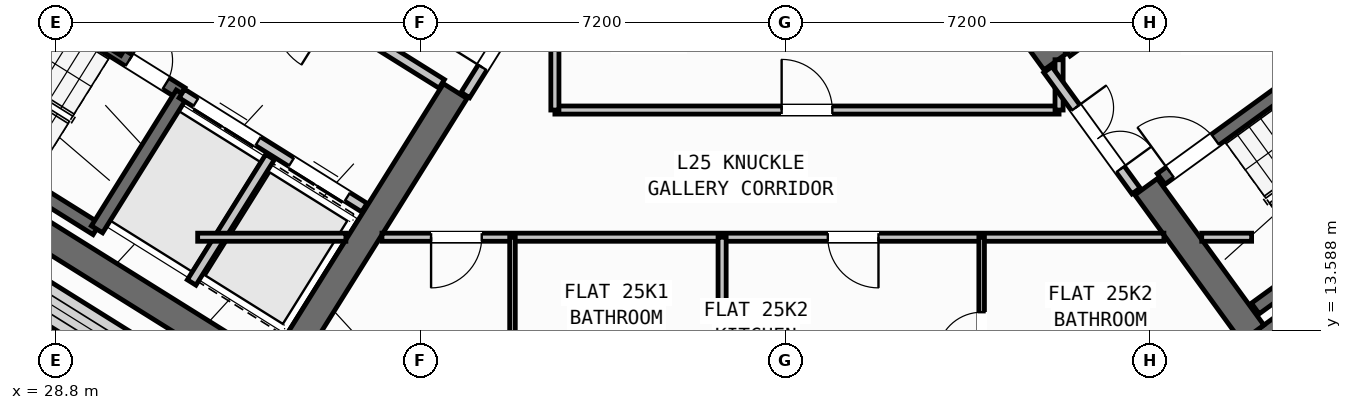
"""IFC4 building model, lengths in metres.
Left out: names, types, materials, properties, quantities, classifications, styles, units other than length and angle.
Written with IfcOpenShell. Run it as: python <this file> out.ifc"""

import sys

from ifc_helpers import new_model, si_unit, direction, frame, frame_2d, origin, place, context, subcontext, project, spatial, rectangle, extrude, source, transform, mapped, element, fill, save


model = new_model("IFC4")
c1 = context("Model", 3, precision=1e-05, world=origin(), true_north=direction((0.0, 1.0)))
c2 = subcontext(c1, "Body", "Model", "MODEL_VIEW")
j1 = project(units=[si_unit("LENGTHUNIT", "METRE"), si_unit("PLANEANGLEUNIT", "RADIAN")], contexts=[c1])
p1 = place(None, origin())
s1 = spatial("IfcSite", under=j1, at=p1, CompositionType="ELEMENT")
p2 = place(p1, origin())
s2 = spatial("IfcBuilding", under=s1, at=p2, CompositionType="ELEMENT")
p3 = place(p2, frame((0.0, 0.0, 100.8)))
s3 = spatial("IfcBuildingStorey", under=s2, at=p3, CompositionType="ELEMENT", Elevation=100.8)
p4 = place(p3, frame((33.366, 12.477, 0.0), z_axis=(0.0, 0.0, 1.0), x_axis=(-0.848047359947, 0.529920442413, 0.0)))
e1 = element("IfcWall", 1, at=p4, inside=s3, PredefinedType="SHEAR", context=c2, shape_type="SweptSolid", body=[
    extrude(rectangle(XDim=13.14, YDim=0.55, at=frame_2d((6.57, 0.0))), origin(), (0.0, 0.0, 1.0), 4.25),
])
p5 = place(p3, frame((36.683, 18.304, 0.0), z_axis=(0.0, 0.0, 1.0), x_axis=(-0.529896466841, -0.848062341122, 0.0)))
e2 = element("IfcWall", 2, at=p5, inside=s3, PredefinedType="SHEAR", context=c2, shape_type="SweptSolid", body=[
    extrude(rectangle(XDim=6.425, YDim=0.55, at=frame_2d((3.212, 0.0))), origin(), (0.0, 0.0, 1.0), 4.25),
])
p6 = place(p3, frame((52.359, 13.14, 0.0), z_axis=(0.0, 0.0, 1.0), x_axis=(0.809014896919, 0.587788139183, 0.0)))
e3 = element("IfcWall", 3, at=p6, inside=s3, PredefinedType="SHEAR", context=c2, shape_type="SweptSolid", body=[
    extrude(rectangle(XDim=12.34, YDim=0.55, at=frame_2d((6.17, 0.0))), origin(), (0.0, 0.0, 1.0), 4.25),
])
p7 = place(p3, frame((52.42, 13.524, 0.0), z_axis=(0.0, 0.0, 1.0), x_axis=(-0.587802113096, 0.809004744015, 0.0)))
e4 = element("IfcWall", 4, at=p7, inside=s3, PredefinedType="SHEAR", context=c2, shape_type="SweptSolid", body=[
    extrude(rectangle(XDim=3.575, YDim=0.55, at=frame_2d((1.788, 0.0))), origin(), (0.0, 0.0, 1.0), 4.25),
])
p8 = place(p3, frame((48.526, 18.884, 0.0), z_axis=(0.0, 0.0, 1.0), x_axis=(-0.587764933797, 0.809031756236, 0.0)))
e5 = element("IfcWall", 5, at=p8, inside=s3, PredefinedType="SHEAR", context=c2, shape_type="SweptSolid", body=[
    extrude(rectangle(XDim=6.425, YDim=0.55, at=frame_2d((3.212, 0.0))), origin(), (0.0, 0.0, 1.0), 4.25),
])
p9 = place(p3, frame((31.76, 12.183, 0.0), z_axis=(0.0, 0.0, 1.0), x_axis=(-0.848047074256, 0.529920899612, 0.0)))
e6 = element("IfcWall", 6, at=p9, inside=s3, PredefinedType="STANDARD", context=c2, shape_type="SweptSolid", body=[
    extrude(rectangle(XDim=30.652, YDim=0.32, at=frame_2d((15.326, 0.0))), origin(), (0.0, 0.0, 1.0), 4.25),
])
p10 = place(p9, frame((15.153, 0.0, 0.0)))
e7 = element("IfcOpeningElement", 7, at=p10, cuts=e6, PredefinedType="OPENING", context=c2, shape_type="SweptSolid", body=[
    extrude(rectangle(XDim=1.2, YDim=2.15, at=frame_2d((0.6, 1.075))), frame((0.0, 0.17, 0.0), z_axis=(0.0, -1.0, 0.0), x_axis=(1.0, 0.0, 0.0)), (0.0, 0.0, 1.0), 0.34),
])
p11 = place(p9, frame((1.652, 0.0, 0.65)))
e8 = element("IfcOpeningElement", 8, at=p11, cuts=e6, PredefinedType="OPENING", context=c2, shape_type="SweptSolid", body=[
    extrude(rectangle(XDim=2.8, YDim=2.1, at=frame_2d((1.4, 1.05))), frame((0.0, 0.17, 0.0), z_axis=(0.0, -1.0, 0.0), x_axis=(1.0, 0.0, 0.0)), (0.0, 0.0, 1.0), 0.34),
])
p12 = place(p9, frame((6.856, 0.0, 0.65)))
e9 = element("IfcOpeningElement", 9, at=p12, cuts=e6, PredefinedType="OPENING", context=c2, shape_type="SweptSolid", body=[
    extrude(rectangle(XDim=2.8, YDim=2.1, at=frame_2d((1.4, 1.05))), frame((0.0, 0.17, 0.0), z_axis=(0.0, -1.0, 0.0), x_axis=(1.0, 0.0, 0.0)), (0.0, 0.0, 1.0), 0.34),
])
p13 = place(p9, frame((20.478, 0.0, 0.85)))
e10 = element("IfcOpeningElement", 10, at=p13, cuts=e6, PredefinedType="OPENING", context=c2, shape_type="SweptSolid", body=[
    extrude(rectangle(XDim=1.5, YDim=1.5, at=frame_2d((0.75, 0.75))), frame((0.0, 0.17, 0.0), z_axis=(0.0, -1.0, 0.0), x_axis=(1.0, 0.0, 0.0)), (0.0, 0.0, 1.0), 0.34),
])
p14 = place(p9, frame((26.258, 0.0, 0.65)))
e11 = element("IfcOpeningElement", 11, at=p14, cuts=e6, PredefinedType="OPENING", context=c2, shape_type="SweptSolid", body=[
    extrude(rectangle(XDim=2.8, YDim=2.1, at=frame_2d((1.4, 1.05))), frame((0.0, 0.17, 0.0), z_axis=(0.0, -1.0, 0.0), x_axis=(1.0, 0.0, 0.0)), (0.0, 0.0, 1.0), 0.34),
])
p15 = place(p3, frame((29.605, 15.581, 0.0), z_axis=(0.0, 0.0, 1.0), x_axis=(-0.848036911448, 0.529937163087, 0.0)))
e12 = element("IfcWall", 12, at=p15, inside=s3, PredefinedType="SHEAR", context=c2, shape_type="SweptSolid", body=[
    extrude(rectangle(XDim=7.46, YDim=0.26, at=frame_2d((3.73, 0.0))), origin(), (0.0, 0.0, 1.0), 4.25),
])
p16 = place(p3, frame((31.28, 18.261, 0.0), z_axis=(0.0, 0.0, 1.0), x_axis=(-0.848051618787, 0.529913626805, 0.0)))
e13 = element("IfcWall", 13, at=p16, inside=s3, PredefinedType="SHEAR", context=c2, shape_type="SweptSolid", body=[
    extrude(rectangle(XDim=7.46, YDim=0.26, at=frame_2d((3.73, 0.0))), origin(), (0.0, 0.0, 1.0), 4.25),
])
p17 = place(p16, frame((0.36, 0.0, 0.0)))
e14 = element("IfcOpeningElement", 14, at=p17, cuts=e13, PredefinedType="OPENING", context=c2, shape_type="SweptSolid", body=[
    extrude(rectangle(XDim=0.86, YDim=2.05, at=frame_2d((0.43, 1.025))), frame((0.0, 0.14, 0.0), z_axis=(0.0, -1.0, 0.0), x_axis=(1.0, 0.0, 0.0)), (0.0, 0.0, 1.0), 0.28),
])
p18 = place(p3, frame((31.288, 18.256, 0.0), z_axis=(0.0, 0.0, 1.0), x_axis=(-0.529943379326, -0.848033026897, 0.0)))
e15 = element("IfcWall", 15, at=p18, inside=s3, PredefinedType="SHEAR", context=c2, shape_type="SweptSolid", body=[
    extrude(rectangle(XDim=3.16, YDim=0.26, at=frame_2d((1.58, 0.0))), origin(), (0.0, 0.0, 1.0), 4.25),
])
p19 = place(p3, frame((34.891, 16.005, 0.0), z_axis=(0.0, 0.0, 1.0), x_axis=(-0.848062873452, 0.529895614884, 0.0)))
e16 = element("IfcWall", 16, at=p19, inside=s3, PredefinedType="STANDARD", context=c2, shape_type="SweptSolid", body=[
    extrude(rectangle(XDim=4.248, YDim=0.2, at=frame_2d((2.124, 0.0))), origin(), (0.0, 0.0, 1.0), 4.24),
])
p20 = place(p19, frame((0.398, 0.0, 0.0)))
e17 = element("IfcOpeningElement", 17, at=p20, cuts=e16, PredefinedType="OPENING", context=c2, shape_type="SweptSolid", body=[
    extrude(rectangle(XDim=1.3, YDim=2.2, at=frame_2d((0.65, 1.1))), frame((0.0, 0.11, 0.0), z_axis=(0.0, -1.0, 0.0), x_axis=(1.0, 0.0, 0.0)), (0.0, 0.0, 1.0), 0.22),
])
p21 = place(p19, frame((2.473, 0.0, 0.0)))
e18 = element("IfcOpeningElement", 18, at=p21, cuts=e16, PredefinedType="OPENING", context=c2, shape_type="SweptSolid", body=[
    extrude(rectangle(XDim=1.45, YDim=2.25, at=frame_2d((0.725, 1.125))), frame((0.0, 0.11, 0.0), z_axis=(0.0, -1.0, 0.0), x_axis=(1.0, 0.0, 0.0)), (0.0, 0.0, 1.0), 0.22),
])
p22 = place(p3, frame((36.417, 18.447, 0.0), z_axis=(0.0, 0.0, 1.0), x_axis=(-0.848064879198, 0.529892404805, 0.0)))
e19 = element("IfcWall", 19, at=p22, inside=s3, PredefinedType="STANDARD", context=c2, shape_type="SweptSolid", body=[
    extrude(rectangle(XDim=5.768, YDim=0.2, at=frame_2d((2.884, 0.0))), origin(), (0.0, 0.0, 1.0), 4.24),
])
p23 = place(p22, frame((2.548, 0.0, 0.0)))
e20 = element("IfcOpeningElement", 20, at=p23, cuts=e19, PredefinedType="OPENING", context=c2, shape_type="SweptSolid", body=[
    extrude(rectangle(XDim=1.15, YDim=2.1, at=frame_2d((0.575, 1.05))), frame((0.0, 0.11, 0.0), z_axis=(0.0, -1.0, 0.0), x_axis=(1.0, 0.0, 0.0)), (0.0, 0.0, 1.0), 0.22),
])
p24 = place(p3, frame((33.029, 17.003, 0.0), z_axis=(0.0, 0.0, 1.0), x_axis=(-0.529916267533, -0.848049968695, 0.0)))
e21 = element("IfcWall", 21, at=p24, inside=s3, PredefinedType="STANDARD", context=c2, shape_type="SweptSolid", body=[
    extrude(rectangle(XDim=2.92, YDim=0.2, at=frame_2d((1.46, 0.0))), origin(), (0.0, 0.0, 1.0), 4.24),
])
p25 = place(p3, frame((31.525, 21.504, 0.0), z_axis=(0.0, 0.0, 1.0), x_axis=(-0.529907497854, -0.848055448493, 0.0)))
e22 = element("IfcWall", 22, at=p25, inside=s3, PredefinedType="STANDARD", context=c2, shape_type="SweptSolid", body=[
    extrude(rectangle(XDim=2.88, YDim=0.2, at=frame_2d((1.44, 0.0))), origin(), (0.0, 0.0, 1.0), 4.24),
])
p26 = place(p3, frame((52.472, 14.013, 0.0), z_axis=(0.0, 0.0, 1.0), x_axis=(0.809028366311, 0.587769599847, 0.0)))
e23 = element("IfcWall", 23, at=p26, inside=s3, PredefinedType="SHEAR", context=c2, shape_type="SweptSolid", body=[
    extrude(rectangle(XDim=7.33, YDim=0.26, at=frame_2d((3.665, 0.0))), origin(), (0.0, 0.0, 1.0), 4.25),
])
p27 = place(p3, frame((50.615, 16.57, 0.0), z_axis=(0.0, 0.0, 1.0), x_axis=(0.809028366311, 0.587769599847, 0.0)))
e24 = element("IfcWall", 24, at=p27, inside=s3, PredefinedType="SHEAR", context=c2, shape_type="SweptSolid", body=[
    extrude(rectangle(XDim=7.33, YDim=0.26, at=frame_2d((3.665, 0.0))), origin(), (0.0, 0.0, 1.0), 4.25),
])
p28 = place(p27, frame((0.22, 0.0, 0.0)))
e25 = element("IfcOpeningElement", 25, at=p28, cuts=e24, PredefinedType="OPENING", context=c2, shape_type="SweptSolid", body=[
    extrude(rectangle(XDim=1.1, YDim=2.1, at=frame_2d((0.55, 1.05))), frame((0.0, 0.14, 0.0), z_axis=(0.0, -1.0, 0.0), x_axis=(1.0, 0.0, 0.0)), (0.0, 0.0, 1.0), 0.28),
])
p29 = place(p3, frame((48.758, 19.077, 0.0), z_axis=(0.0, 0.0, 1.0), x_axis=(0.809005065155, 0.587801671104, 0.0)))
e26 = element("IfcWall", 26, at=p29, inside=s3, PredefinedType="STANDARD", context=c2, shape_type="SweptSolid", body=[
    extrude(rectangle(XDim=5.768, YDim=0.2, at=frame_2d((2.884, 0.0))), origin(), (0.0, 0.0, 1.0), 4.24),
])
p30 = place(p29, frame((2.548, 0.0, 0.0)))
e27 = element("IfcOpeningElement", 27, at=p30, cuts=e26, PredefinedType="OPENING", context=c2, shape_type="SweptSolid", body=[
    extrude(rectangle(XDim=1.15, YDim=2.1, at=frame_2d((0.575, 1.05))), frame((0.0, 0.11, 0.0), z_axis=(0.0, -1.0, 0.0), x_axis=(1.0, 0.0, 0.0)), (0.0, 0.0, 1.0), 0.22),
])
p31 = place(p3, frame((38.451, 20.737, 0.0), z_axis=(0.0, 0.0, 1.0), x_axis=(-0.529924799939, -0.848044637038, 0.0)))
e28 = element("IfcWall", 28, at=p31, inside=s3, PredefinedType="STANDARD", context=c2, shape_type="SweptSolid", body=[
    extrude(rectangle(XDim=2.96, YDim=0.2, at=frame_2d((1.48, 0.0))), origin(), (0.0, 0.0, 1.0), 4.24),
])
p32 = place(p31, frame((1.46, 0.0, 0.0)))
e29 = element("IfcOpeningElement", 29, at=p32, cuts=e28, PredefinedType="OPENING", context=c2, shape_type="SweptSolid", body=[
    extrude(rectangle(XDim=0.86, YDim=2.05, at=frame_2d((0.43, 1.025))), frame((0.0, 0.11, 0.0), z_axis=(0.0, -1.0, 0.0), x_axis=(1.0, 0.0, 0.0)), (0.0, 0.0, 1.0), 0.22),
])
p33 = place(p3, frame((31.6, 15.42, 0.0), z_axis=(0.0, 0.0, 1.0), x_axis=(1.0, 0.0, 0.0)))
e30 = element("IfcWall", 30, at=p33, inside=s3, PredefinedType="PARTITIONING", context=c2, shape_type="SweptSolid", body=[
    extrude(rectangle(XDim=2.925, YDim=0.16, at=frame_2d((1.462, 0.0))), origin(), (0.0, 0.0, 1.0), 4.24),
])
p34 = place(p3, frame((35.237, 15.42, 0.0), z_axis=(0.0, 0.0, 1.0), x_axis=(1.0, 0.0, 0.0)))
e31 = element("IfcWall", 31, at=p34, inside=s3, PredefinedType="PARTITIONING", context=c2, shape_type="SweptSolid", body=[
    extrude(rectangle(XDim=15.432, YDim=0.16, at=frame_2d((7.716, 0.0))), origin(), (0.0, 0.0, 1.0), 4.24),
])
p35 = place(p34, frame((0.969, 0.0, 0.0)))
e32 = element("IfcOpeningElement", 32, at=p35, cuts=e31, PredefinedType="OPENING", context=c2, shape_type="SweptSolid", body=[
    extrude(rectangle(XDim=1.0, YDim=2.1, at=frame_2d((0.5, 1.05))), frame((0.0, 0.09, 0.0), z_axis=(0.0, -1.0, 0.0), x_axis=(1.0, 0.0, 0.0)), (0.0, 0.0, 1.0), 0.18),
])
p36 = place(p34, frame((8.799, 0.0, 0.0)))
e33 = element("IfcOpeningElement", 33, at=p36, cuts=e31, PredefinedType="OPENING", context=c2, shape_type="SweptSolid", body=[
    extrude(rectangle(XDim=1.0, YDim=2.1, at=frame_2d((0.5, 1.05))), frame((0.0, 0.09, 0.0), z_axis=(0.0, -1.0, 0.0), x_axis=(1.0, 0.0, 0.0)), (0.0, 0.0, 1.0), 0.18),
])
p37 = place(p3, frame((51.416, 15.42, 0.0), z_axis=(0.0, 0.0, 1.0), x_axis=(1.0, 0.0, 0.0)))
e34 = element("IfcWall", 34, at=p37, inside=s3, PredefinedType="PARTITIONING", context=c2, shape_type="SweptSolid", body=[
    extrude(rectangle(XDim=0.984, YDim=0.16, at=frame_2d((0.492, 0.0))), origin(), (0.0, 0.0, 1.0), 4.24),
])
p38 = place(p3, frame((38.65, 17.93, 0.0), z_axis=(0.0, 0.0, 1.0), x_axis=(1.0, 0.0, 0.0)))
e35 = element("IfcWall", 35, at=p38, inside=s3, PredefinedType="PARTITIONING", context=c2, shape_type="SweptSolid", body=[
    extrude(rectangle(XDim=9.95, YDim=0.16, at=frame_2d((4.975, 0.0))), origin(), (0.0, 0.0, 1.0), 4.24),
])
p39 = place(p38, frame((4.475, 0.0, 0.0)))
e36 = element("IfcOpeningElement", 36, at=p39, cuts=e35, PredefinedType="OPENING", context=c2, shape_type="SweptSolid", body=[
    extrude(rectangle(XDim=1.0, YDim=2.1, at=frame_2d((0.5, 1.05))), frame((0.0, 0.09, 0.0), z_axis=(0.0, -1.0, 0.0), x_axis=(1.0, 0.0, 0.0)), (0.0, 0.0, 1.0), 0.18),
])
p40 = place(p3, frame((38.65, 17.93, 0.0), z_axis=(0.0, 0.0, 1.0), x_axis=(0.0, 1.0, 0.0)))
e37 = element("IfcWall", 37, at=p40, inside=s3, PredefinedType="PARTITIONING", context=c2, shape_type="SweptSolid", body=[
    extrude(rectangle(XDim=2.951, YDim=0.16, at=frame_2d((1.476, 0.0))), origin(), (0.0, 0.0, 1.0), 4.24),
])
p41 = place(p3, frame((48.6, 17.93, 0.0), z_axis=(0.0, 0.0, 1.0), x_axis=(0.0, 1.0, 0.0)))
e38 = element("IfcWall", 38, at=p41, inside=s3, PredefinedType="PARTITIONING", context=c2, shape_type="SweptSolid", body=[
    extrude(rectangle(XDim=0.993, YDim=0.16, at=frame_2d((0.496, 0.0))), origin(), (0.0, 0.0, 1.0), 4.24),
])
p42 = place(p3, frame((50.119, 16.333, 0.0), z_axis=(0.0, 0.0, 1.0), x_axis=(-0.587749856981, 0.809042709391, 0.0)))
e39 = element("IfcWall", 39, at=p42, inside=s3, PredefinedType="STANDARD", context=c2, shape_type="SweptSolid", body=[
    extrude(rectangle(XDim=2.96, YDim=0.2, at=frame_2d((1.48, 0.0))), origin(), (0.0, 0.0, 1.0), 4.24),
])
p43 = place(p42, frame((0.53, 0.0, 0.0)))
e40 = element("IfcOpeningElement", 40, at=p43, cuts=e39, PredefinedType="OPENING", context=c2, shape_type="SweptSolid", body=[
    extrude(rectangle(XDim=1.5, YDim=2.15, at=frame_2d((0.75, 1.075))), frame((0.0, 0.11, 0.0), z_axis=(0.0, -1.0, 0.0), x_axis=(1.0, 0.0, 0.0)), (0.0, 0.0, 1.0), 0.22),
])
p44 = place(p3, frame((41.95, 1.96, 0.0), z_axis=(0.0, 0.0, 1.0), x_axis=(0.0, 1.0, 0.0)))
e41 = element("IfcWall", 41, at=p44, inside=s3, PredefinedType="PARTITIONING", context=c2, shape_type="SweptSolid", body=[
    extrude(rectangle(XDim=13.46, YDim=0.16, at=frame_2d((6.73, 0.0))), origin(), (0.0, 0.0, 1.0), 4.24),
])
p45 = place(p3, frame((37.813, 1.96, 0.0), z_axis=(0.0, 0.0, 1.0), x_axis=(0.0, 1.0, 0.0)))
e42 = element("IfcWall", 42, at=p45, inside=s3, PredefinedType="PARTITIONING", context=c2, shape_type="SweptSolid", body=[
    extrude(rectangle(XDim=13.46, YDim=0.11, at=frame_2d((6.73, 0.0))), origin(), (0.0, 0.0, 1.0), 4.24),
])
p46 = place(p45, frame((5.5, 0.0, 0.0)))
e43 = element("IfcOpeningElement", 43, at=p46, cuts=e42, PredefinedType="OPENING", context=c2, shape_type="SweptSolid", body=[
    extrude(rectangle(XDim=0.92, YDim=2.08, at=frame_2d((0.46, 1.04))), frame((0.0, 0.065, 0.0), z_axis=(0.0, -1.0, 0.0), x_axis=(1.0, 0.0, 0.0)), (0.0, 0.0, 1.0), 0.13),
])
p47 = place(p45, frame((10.45, 0.0, 0.0)))
e44 = element("IfcOpeningElement", 44, at=p47, cuts=e42, PredefinedType="OPENING", context=c2, shape_type="SweptSolid", body=[
    extrude(rectangle(XDim=0.88, YDim=2.08, at=frame_2d((0.44, 1.04))), frame((0.0, 0.065, 0.0), z_axis=(0.0, -1.0, 0.0), x_axis=(1.0, 0.0, 0.0)), (0.0, 0.0, 1.0), 0.13),
])
p48 = place(p3, frame((47.072, 1.96, 0.0), z_axis=(0.0, 0.0, 1.0), x_axis=(0.0, 1.0, 0.0)))
e45 = element("IfcWall", 45, at=p48, inside=s3, PredefinedType="PARTITIONING", context=c2, shape_type="SweptSolid", body=[
    extrude(rectangle(XDim=13.46, YDim=0.11, at=frame_2d((6.73, 0.0))), origin(), (0.0, 0.0, 1.0), 4.24),
])
p49 = place(p48, frame((6.6, 0.0, 0.0)))
e46 = element("IfcOpeningElement", 46, at=p49, cuts=e45, PredefinedType="OPENING", context=c2, shape_type="SweptSolid", body=[
    extrude(rectangle(XDim=0.92, YDim=2.08, at=frame_2d((0.46, 1.04))), frame((0.0, 0.065, 0.0), z_axis=(0.0, -1.0, 0.0), x_axis=(1.0, 0.0, 0.0)), (0.0, 0.0, 1.0), 0.13),
])
p50 = place(p48, frame((11.1, 0.0, 0.0)))
e47 = element("IfcOpeningElement", 47, at=p50, cuts=e45, PredefinedType="OPENING", context=c2, shape_type="SweptSolid", body=[
    extrude(rectangle(XDim=0.88, YDim=2.08, at=frame_2d((0.44, 1.04))), frame((0.0, 0.065, 0.0), z_axis=(0.0, -1.0, 0.0), x_axis=(1.0, 0.0, 0.0)), (0.0, 0.0, 1.0), 0.13),
])
m1 = source(origin(), c2, "Body", "SweptSolid", [
    extrude(rectangle(XDim=2.8, YDim=2.1, at=frame_2d((1.4, 1.05))), frame((0.0, 0.03, 0.0), z_axis=(0.0, -1.0, 0.0), x_axis=(1.0, 0.0, 0.0)), (0.0, 0.0, 1.0), 0.06),
])
p51 = place(p11, origin())
e48 = element("IfcWindow", 48, at=p51, inside=s3, PartitioningType="SINGLE_PANEL", PredefinedType="WINDOW", context=c2, shape_type="MappedRepresentation", body=[
    mapped(m1, transform((0.0, 0.0, 0.0), scale=1.0)),
])
fill(e8, e48)
m2 = source(origin(), c2, "Body", "SweptSolid", [
    extrude(rectangle(XDim=0.86, YDim=2.05, at=frame_2d((0.43, 1.025))), frame((0.0, 0.025, 0.0), z_axis=(0.0, -1.0, 0.0), x_axis=(1.0, 0.0, 0.0)), (0.0, 0.0, 1.0), 0.05),
])
p52 = place(p17, frame((0.86, 0.0, 0.0), z_axis=(0.0, 0.0, 1.0), x_axis=(-1.0, 0.0, 0.0)))
e49 = element("IfcDoor", 49, at=p52, inside=s3, OperationType="SINGLE_SWING_LEFT", PredefinedType="DOOR", context=c2, shape_type="MappedRepresentation", body=[
    mapped(m2, transform((0.0, 0.0, 0.0), scale=1.0)),
])
fill(e14, e49)
m3 = source(origin(), c2, "Body", "SweptSolid", [
    extrude(rectangle(XDim=1.3, YDim=2.2, at=frame_2d((0.65, 1.1))), frame((0.0, 0.025, 0.0), z_axis=(0.0, -1.0, 0.0), x_axis=(1.0, 0.0, 0.0)), (0.0, 0.0, 1.0), 0.05),
])
p53 = place(p20, origin())
e50 = element("IfcDoor", 50, at=p53, inside=s3, OperationType="DOUBLE_DOOR_SLIDING", PredefinedType="DOOR", context=c2, shape_type="MappedRepresentation", body=[
    mapped(m3, transform((0.0, 0.0, 0.0), scale=1.0)),
])
fill(e17, e50)
m4 = source(origin(), c2, "Body", "SweptSolid", [
    extrude(rectangle(XDim=1.45, YDim=2.25, at=frame_2d((0.725, 1.125))), frame((0.0, 0.025, 0.0), z_axis=(0.0, -1.0, 0.0), x_axis=(1.0, 0.0, 0.0)), (0.0, 0.0, 1.0), 0.05),
])
p54 = place(p21, origin())
e51 = element("IfcDoor", 51, at=p54, inside=s3, OperationType="DOUBLE_DOOR_SLIDING", PredefinedType="DOOR", context=c2, shape_type="MappedRepresentation", body=[
    mapped(m4, transform((0.0, 0.0, 0.0), scale=1.0)),
])
fill(e18, e51)
m5 = source(origin(), c2, "Body", "SweptSolid", [
    extrude(rectangle(XDim=1.1, YDim=2.1, at=frame_2d((0.55, 1.05))), frame((0.0, 0.025, 0.0), z_axis=(0.0, -1.0, 0.0), x_axis=(1.0, 0.0, 0.0)), (0.0, 0.0, 1.0), 0.05),
])
p55 = place(p28, origin())
e52 = element("IfcDoor", 52, at=p55, inside=s3, OperationType="SINGLE_SWING_LEFT", PredefinedType="DOOR", context=c2, shape_type="MappedRepresentation", body=[
    mapped(m5, transform((0.0, 0.0, 0.0), scale=1.0)),
])
fill(e25, e52)
m6 = source(origin(), c2, "Body", "SweptSolid", [
    extrude(rectangle(XDim=1.0, YDim=2.1, at=frame_2d((0.5, 1.05))), frame((0.0, 0.025, 0.0), z_axis=(0.0, -1.0, 0.0), x_axis=(1.0, 0.0, 0.0)), (0.0, 0.0, 1.0), 0.05),
])
p56 = place(p39, origin())
e53 = element("IfcDoor", 53, at=p56, inside=s3, OperationType="SINGLE_SWING_LEFT", PredefinedType="DOOR", context=c2, shape_type="MappedRepresentation", body=[
    mapped(m6, transform((0.0, 0.0, 0.0), scale=1.0)),
])
fill(e36, e53)
p57 = place(p32, frame((0.86, 0.0, 0.0), z_axis=(0.0, 0.0, 1.0), x_axis=(-1.0, 0.0, 0.0)))
e54 = element("IfcDoor", 54, at=p57, inside=s3, OperationType="SINGLE_SWING_LEFT", PredefinedType="DOOR", context=c2, shape_type="MappedRepresentation", body=[
    mapped(m2, transform((0.0, 0.0, 0.0), scale=1.0)),
])
fill(e29, e54)
m7 = source(origin(), c2, "Body", "SweptSolid", [
    extrude(rectangle(XDim=1.5, YDim=2.15, at=frame_2d((0.75, 1.075))), frame((0.0, 0.025, 0.0), z_axis=(0.0, -1.0, 0.0), x_axis=(1.0, 0.0, 0.0)), (0.0, 0.0, 1.0), 0.05),
])
p58 = place(p43, frame((1.5, 0.0, 0.0), z_axis=(0.0, 0.0, 1.0), x_axis=(-1.0, 0.0, 0.0)))
e55 = element("IfcDoor", 55, at=p58, inside=s3, OperationType="DOUBLE_DOOR_SINGLE_SWING", PredefinedType="DOOR", context=c2, shape_type="MappedRepresentation", body=[
    mapped(m7, transform((0.0, 0.0, 0.0), scale=1.0)),
])
fill(e40, e55)
p59 = place(p35, frame((1.0, 0.0, 0.0), z_axis=(0.0, 0.0, 1.0), x_axis=(-1.0, 0.0, 0.0)))
e56 = element("IfcDoor", 56, at=p59, inside=s3, OperationType="SINGLE_SWING_RIGHT", PredefinedType="DOOR", context=c2, shape_type="MappedRepresentation", body=[
    mapped(m6, transform((0.0, 0.0, 0.0), scale=1.0)),
])
fill(e32, e56)
p60 = place(p36, frame((1.0, 0.0, 0.0), z_axis=(0.0, 0.0, 1.0), x_axis=(-1.0, 0.0, 0.0)))
e57 = element("IfcDoor", 57, at=p60, inside=s3, OperationType="SINGLE_SWING_LEFT", PredefinedType="DOOR", context=c2, shape_type="MappedRepresentation", body=[
    mapped(m6, transform((0.0, 0.0, 0.0), scale=1.0)),
])
fill(e33, e57)
m8 = source(origin(), c2, "Body", "SweptSolid", [
    extrude(rectangle(XDim=0.88, YDim=2.08, at=frame_2d((0.44, 1.04))), frame((0.0, 0.025, 0.0), z_axis=(0.0, -1.0, 0.0), x_axis=(1.0, 0.0, 0.0)), (0.0, 0.0, 1.0), 0.05),
])
p61 = place(p50, origin())
e58 = element("IfcDoor", 58, at=p61, inside=s3, OperationType="SINGLE_SWING_LEFT", PredefinedType="DOOR", context=c2, shape_type="MappedRepresentation", body=[
    mapped(m8, transform((0.0, 0.0, 0.0), scale=1.0)),
])
fill(e47, e58)
save(model, sys.argv[1])
